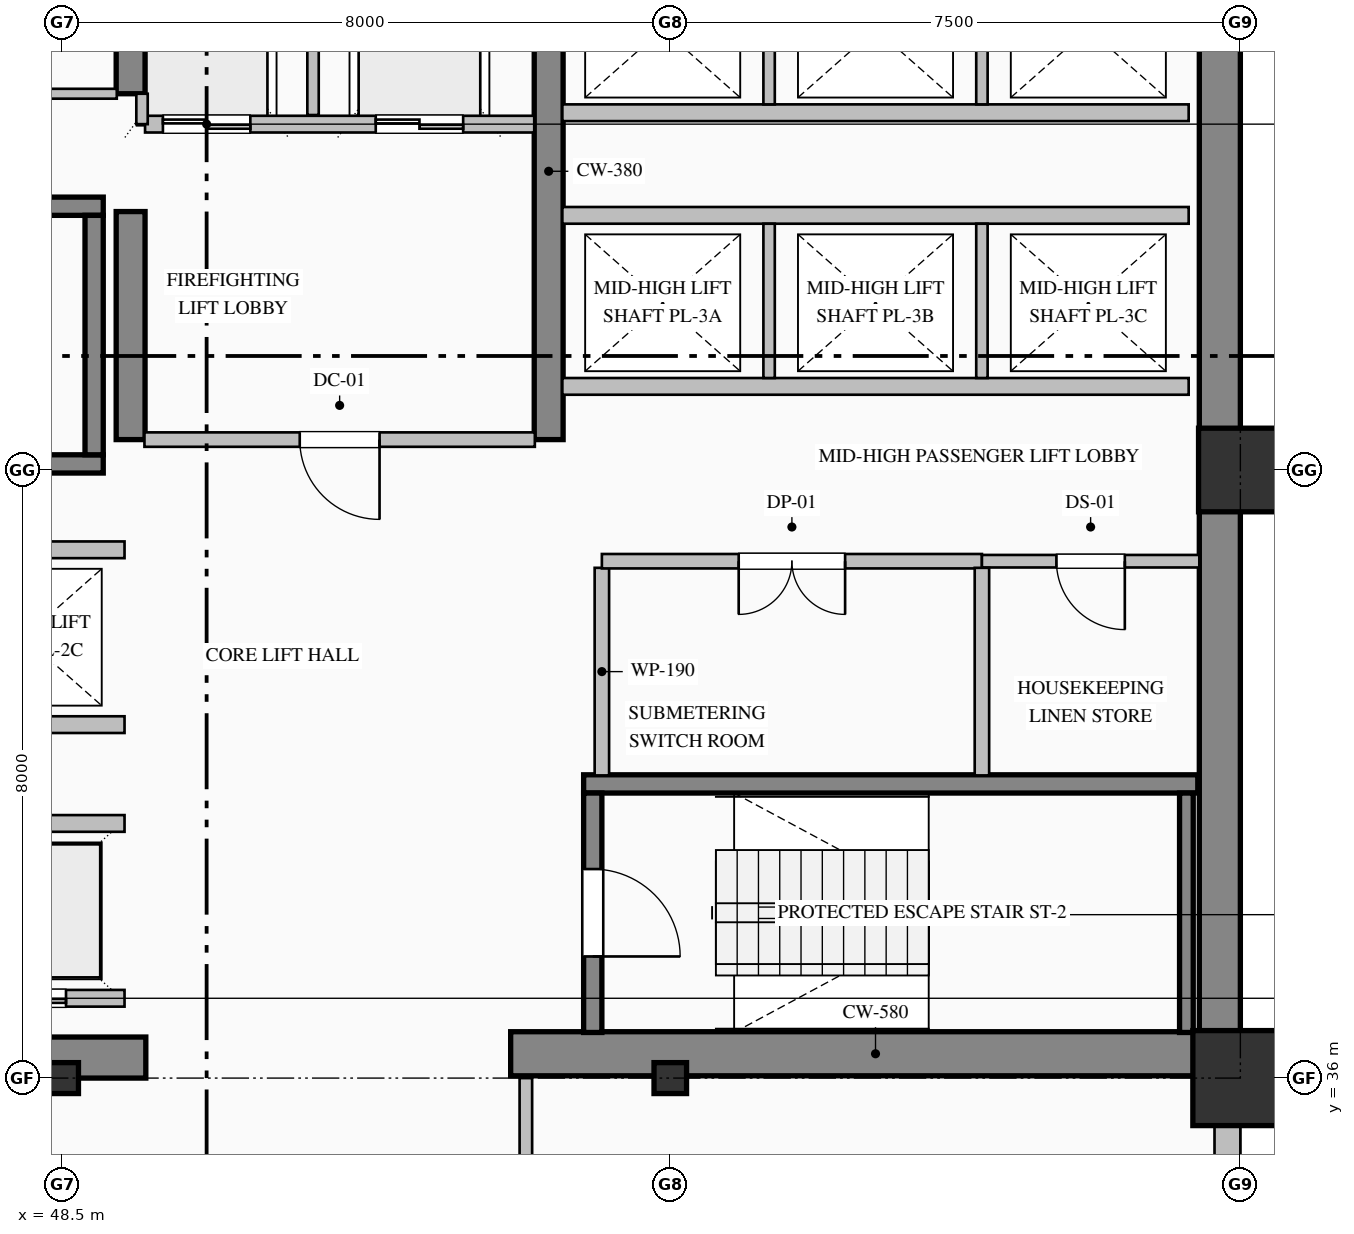
"""IFC4 building model, lengths in metres.
Left out: names, types, materials, properties, quantities, classifications, styles, units other than length and angle.
Written with IfcOpenShell. Run it as: python <this file> out.ifc"""

import sys

from ifc_helpers import new_model, si_unit, direction, frame, frame_2d, origin, origin_2d, place, context, subcontext, project, spatial, rectangle, hollow_rectangle, i_section, extrude, element, fill, save


model = new_model("IFC4")
c1 = context("Model", 3, precision=1e-05, world=origin(), true_north=direction((0.0, 1.0)))
c2 = subcontext(c1, "Body", "Model", "MODEL_VIEW")
j1 = project(units=[si_unit("LENGTHUNIT", "METRE"), si_unit("PLANEANGLEUNIT", "RADIAN")], contexts=[c1])
p1 = place(None, origin())
s1 = spatial("IfcSite", under=j1, at=p1, CompositionType="ELEMENT")
p2 = place(p1, origin())
s2 = spatial("IfcBuilding", under=s1, at=p2, CompositionType="ELEMENT")
p3 = place(p2, frame((0.0, 0.0, 48.2)))
s3 = spatial("IfcBuildingStorey", under=s2, at=p3, CompositionType="ELEMENT", Elevation=48.2)
p4 = place(p3, frame((63.73, 36.32, 0.0), z_axis=(0.0, 0.0, 1.0), x_axis=(0.0, 1.0, 0.0)))
e1 = element("IfcWall", 1, at=p4, inside=s3, PredefinedType="SHEAR", context=c2, shape_type="SweptSolid", body=[
    extrude(rectangle(XDim=15.14, YDim=0.54, at=frame_2d((7.57, 0.0))), origin(), (0.0, 0.0, 1.0), 3.75),
])
p5 = place(p3, frame((48.2, 36.27, 0.0), z_axis=(0.0, 0.0, 1.0), x_axis=(1.0, 0.0, 0.0)))
e2 = element("IfcWall", 2, at=p5, inside=s3, PredefinedType="SHEAR", context=c2, shape_type="SweptSolid", body=[
    extrude(rectangle(XDim=1.4, YDim=0.54, at=frame_2d((0.7, 0.0))), origin(), (0.0, 0.0, 1.0), 3.75),
])
p6 = place(p3, frame((54.4, 36.32, 0.0), z_axis=(0.0, 0.0, 1.0), x_axis=(1.0, 0.0, 0.0)))
e3 = element("IfcWall", 3, at=p6, inside=s3, PredefinedType="SHEAR", context=c2, shape_type="SweptSolid", body=[
    extrude(rectangle(XDim=9.6, YDim=0.58, at=frame_2d((4.8, 0.0))), origin(), (0.0, 0.0, 1.0), 4.0),
])
p7 = place(p3, frame((49.4, 44.4, 0.0), z_axis=(0.0, 0.0, 1.0), x_axis=(0.0, 1.0, 0.0)))
e4 = element("IfcWall", 4, at=p7, inside=s3, PredefinedType="SHEAR", context=c2, shape_type="SweptSolid", body=[
    extrude(rectangle(XDim=3.0, YDim=0.38, at=frame_2d((1.5, 0.0))), origin(), (0.0, 0.0, 1.0), 3.75),
])
p8 = place(p3, frame((49.4, 48.95, 0.0), z_axis=(0.0, 0.0, 1.0), x_axis=(0.0, 1.0, 0.0)))
e5 = element("IfcWall", 5, at=p8, inside=s3, PredefinedType="SHEAR", context=c2, shape_type="SweptSolid", body=[
    extrude(rectangle(XDim=2.51, YDim=0.38, at=frame_2d((1.255, 0.0))), origin(), (0.0, 0.0, 1.0), 3.75),
])
p9 = place(p3, frame((54.9, 44.4, 0.0), z_axis=(0.0, 0.0, 1.0), x_axis=(0.0, 1.0, 0.0)))
e6 = element("IfcWall", 6, at=p9, inside=s3, PredefinedType="SHEAR", context=c2, shape_type="SweptSolid", body=[
    extrude(rectangle(XDim=7.06, YDim=0.38, at=frame_2d((3.53, 0.0))), origin(), (0.0, 0.0, 1.0), 3.75),
])
for number, where, z_axis, x_axis in (
    (7, (48.5, 36.0, 0.0), (0.0, 0.0, 1.0), (1.0, 0.0, 0.0)),
    (8, (56.5, 36.0, 0.0), (0.0, 0.0, 1.0), (1.0, 0.0, 0.0)),
):
    element("IfcColumn", number, at=place(p3, frame(where, z_axis=z_axis, x_axis=x_axis)), inside=s3, PredefinedType="COLUMN", context=c2, shape_type="SweptSolid", body=[
        extrude(i_section(OverallWidth=0.407, OverallDepth=0.428, WebThickness=0.02, FlangeThickness=0.035, FilletRadius=0.022, at=origin_2d()), origin(), (0.0, 0.0, 1.0), 4.0),
    ])
p10 = place(p3, frame((64.0, 36.0, 0.0), z_axis=(0.0, 0.0, 1.0), x_axis=(1.0, 0.0, 0.0)))
e9 = element("IfcColumn", 9, at=p10, inside=s3, PredefinedType="COLUMN", context=c2, shape_type="SweptSolid", body=[
    extrude(hollow_rectangle(XDim=1.25, YDim=1.25, WallThickness=0.045, at=origin_2d()), origin(), (0.0, 0.0, 1.0), 4.0),
])
p11 = place(p3, frame((64.0, 44.0, 0.0), z_axis=(0.0, 0.0, 1.0), x_axis=(1.0, 0.0, 0.0)))
e10 = element("IfcColumn", 10, at=p11, inside=s3, PredefinedType="COLUMN", context=c2, shape_type="SweptSolid", body=[
    extrude(hollow_rectangle(XDim=1.1, YDim=1.1, WallThickness=0.04, at=origin_2d()), origin(), (0.0, 0.0, 1.0), 4.0),
])
p12 = place(p3, frame((63.83, 36.05, 0.0), z_axis=(0.0, 0.0, 1.0), x_axis=(0.0, -1.0, 0.0)))
e11 = element("IfcWall", 11, at=p12, inside=s3, PredefinedType="SOLIDWALL", context=c2, shape_type="SweptSolid", body=[
    extrude(rectangle(XDim=28.05, YDim=0.34, at=frame_2d((14.025, 0.0))), origin(), (0.0, 0.0, 1.0), 3.25),
])
p13 = place(p12, frame((2.4, 0.0, 0.8)))
e12 = element("IfcOpeningElement", 12, at=p13, cuts=e11, PredefinedType="OPENING", context=c2, shape_type="SweptSolid", body=[
    extrude(rectangle(XDim=2.4, YDim=2.15, at=frame_2d((1.2, 1.075))), frame((0.0, 0.18, 0.0), z_axis=(0.0, -1.0, 0.0), x_axis=(1.0, 0.0, 0.0)), (0.0, 0.0, 1.0), 0.36),
])
p14 = place(p12, frame((9.75, 0.0, 0.85)))
e13 = element("IfcOpeningElement", 13, at=p14, cuts=e11, PredefinedType="OPENING", context=c2, shape_type="SweptSolid", body=[
    extrude(rectangle(XDim=2.1, YDim=2.05, at=frame_2d((1.05, 1.025))), frame((0.0, 0.18, 0.0), z_axis=(0.0, -1.0, 0.0), x_axis=(1.0, 0.0, 0.0)), (0.0, 0.0, 1.0), 0.36),
])
p15 = place(p12, frame((13.2, 0.0, 0.8)))
e14 = element("IfcOpeningElement", 14, at=p15, cuts=e11, PredefinedType="OPENING", context=c2, shape_type="SweptSolid", body=[
    extrude(rectangle(XDim=2.4, YDim=2.15, at=frame_2d((1.2, 1.075))), frame((0.0, 0.18, 0.0), z_axis=(0.0, -1.0, 0.0), x_axis=(1.0, 0.0, 0.0)), (0.0, 0.0, 1.0), 0.36),
])
for number, where, z_axis, x_axis in (
    (15, (40.96, 47.47, 0.0), (0.0, 0.0, 1.0), (1.0, 0.0, 0.0)),
    (16, (49.04, 44.08, 0.0), (0.0, 0.0, 1.0), (-1.0, 0.0, 0.0)),
):
    element("IfcWall", number, at=place(p3, frame(where, z_axis=z_axis, x_axis=x_axis)), inside=s3, PredefinedType="SOLIDWALL", context=c2, shape_type="SweptSolid", body=[
        extrude(rectangle(XDim=8.08, YDim=0.24, at=frame_2d((4.04, 0.0))), origin(), (0.0, 0.0, 1.0), 4.0),
    ])
p16 = place(p3, frame((48.92, 44.2, 0.0), z_axis=(0.0, 0.0, 1.0), x_axis=(0.0, 1.0, 0.0)))
e17 = element("IfcWall", 17, at=p16, inside=s3, PredefinedType="SOLIDWALL", context=c2, shape_type="SweptSolid", body=[
    extrude(rectangle(XDim=3.15, YDim=0.24, at=frame_2d((1.575, 0.0))), origin(), (0.0, 0.0, 1.0), 4.0),
])
p17 = place(p3, frame((55.36, 39.87, 0.0), z_axis=(0.0, 0.0, 1.0), x_axis=(1.0, 0.0, 0.0)))
e18 = element("IfcWall", 18, at=p17, inside=s3, PredefinedType="SOLIDWALL", context=c2, shape_type="SweptSolid", body=[
    extrude(rectangle(XDim=8.08, YDim=0.24, at=frame_2d((4.04, 0.0))), origin(), (0.0, 0.0, 1.0), 4.0),
])
p18 = place(p3, frame((55.48, 39.75, 0.0), z_axis=(0.0, 0.0, 1.0), x_axis=(0.0, -1.0, 0.0)))
e19 = element("IfcWall", 19, at=p18, inside=s3, PredefinedType="SOLIDWALL", context=c2, shape_type="SweptSolid", body=[
    extrude(rectangle(XDim=3.15, YDim=0.24, at=frame_2d((1.575, 0.0))), origin(), (0.0, 0.0, 1.0), 4.0),
])
p19 = place(p18, frame((1.0, 0.0, 0.0)))
e20 = element("IfcOpeningElement", 20, at=p19, cuts=e19, PredefinedType="OPENING", context=c2, shape_type="SweptSolid", body=[
    extrude(rectangle(XDim=1.15, YDim=2.2, at=frame_2d((0.575, 1.1))), frame((0.0, 0.13, 0.0), z_axis=(0.0, -1.0, 0.0), x_axis=(1.0, 0.0, 0.0)), (0.0, 0.0, 1.0), 0.26),
])
p20 = place(p3, frame((63.29, 36.6, 0.0), z_axis=(0.0, 0.0, 1.0), x_axis=(0.0, 1.0, 0.0)))
e21 = element("IfcWall", 21, at=p20, inside=s3, PredefinedType="SOLIDWALL", context=c2, shape_type="SweptSolid", body=[
    extrude(rectangle(XDim=3.15, YDim=0.18, at=frame_2d((1.575, 0.0))), origin(), (0.0, 0.0, 1.0), 4.0),
])
p21 = place(p3, frame((54.71, 48.55, 0.0), z_axis=(0.0, 0.0, 1.0), x_axis=(-1.0, 0.0, 0.0)))
e22 = element("IfcWall", 22, at=p21, inside=s3, PredefinedType="PARTITIONING", context=c2, shape_type="SweptSolid", body=[
    extrude(rectangle(XDim=5.12, YDim=0.22, at=frame_2d((2.56, 0.0))), origin(), (0.0, 0.0, 1.0), 3.75),
])
p22 = place(p21, frame((3.735, 0.0, 0.0)))
e23 = element("IfcOpeningElement", 23, at=p22, cuts=e22, PredefinedType="OPENING", context=c2, shape_type="SweptSolid", body=[
    extrude(rectangle(XDim=1.15, YDim=2.2, at=frame_2d((0.575, 1.1))), frame((0.0, 0.12, 0.0), z_axis=(0.0, -1.0, 0.0), x_axis=(1.0, 0.0, 0.0)), (0.0, 0.0, 1.0), 0.24),
])
p23 = place(p21, frame((0.935, 0.0, 0.0)))
e24 = element("IfcOpeningElement", 24, at=p23, cuts=e22, PredefinedType="OPENING", context=c2, shape_type="SweptSolid", body=[
    extrude(rectangle(XDim=1.15, YDim=2.2, at=frame_2d((0.575, 1.1))), frame((0.0, 0.12, 0.0), z_axis=(0.0, -1.0, 0.0), x_axis=(1.0, 0.0, 0.0)), (0.0, 0.0, 1.0), 0.24),
])
p24 = place(p3, frame((51.8, 48.67, 0.0), z_axis=(0.0, 0.0, 1.0), x_axis=(0.0, 1.0, 0.0)))
e25 = element("IfcWall", 25, at=p24, inside=s3, PredefinedType="PARTITIONING", context=c2, shape_type="SweptSolid", body=[
    extrude(rectangle(XDim=2.79, YDim=0.15, at=frame_2d((1.395, 0.0))), origin(), (0.0, 0.0, 1.0), 3.75),
])
p25 = place(p3, frame((49.55, 48.55, 0.0), z_axis=(0.0, 0.0, 1.0), x_axis=(0.0, 1.0, 0.0)))
e26 = element("IfcWall", 26, at=p25, inside=s3, PredefinedType="PARTITIONING", context=c2, shape_type="SweptSolid", body=[
    extrude(rectangle(XDim=0.4, YDim=0.15, at=frame_2d((0.2, 0.0))), origin(), (0.0, 0.0, 1.0), 3.75),
])
p26 = place(p3, frame((49.32, 37.05, 0.0), z_axis=(0.0, 0.0, 1.0), x_axis=(-1.0, 0.0, 0.0)))
e27 = element("IfcWall", 27, at=p26, inside=s3, PredefinedType="PARTITIONING", context=c2, shape_type="SweptSolid", body=[
    extrude(rectangle(XDim=8.24, YDim=0.22, at=frame_2d((4.12, 0.0))), origin(), (0.0, 0.0, 1.0), 3.75),
])
p27 = place(p26, frame((6.37, 0.0, 0.0)))
e28 = element("IfcOpeningElement", 28, at=p27, cuts=e27, PredefinedType="OPENING", context=c2, shape_type="SweptSolid", body=[
    extrude(rectangle(XDim=1.1, YDim=2.2, at=frame_2d((0.55, 1.1))), frame((0.0, 0.12, 0.0), z_axis=(0.0, -1.0, 0.0), x_axis=(1.0, 0.0, 0.0)), (0.0, 0.0, 1.0), 0.24),
])
p28 = place(p26, frame((3.57, 0.0, 0.0)))
e29 = element("IfcOpeningElement", 29, at=p28, cuts=e27, PredefinedType="OPENING", context=c2, shape_type="SweptSolid", body=[
    extrude(rectangle(XDim=1.1, YDim=2.2, at=frame_2d((0.55, 1.1))), frame((0.0, 0.12, 0.0), z_axis=(0.0, -1.0, 0.0), x_axis=(1.0, 0.0, 0.0)), (0.0, 0.0, 1.0), 0.24),
])
p29 = place(p26, frame((0.77, 0.0, 0.0)))
e30 = element("IfcOpeningElement", 30, at=p29, cuts=e27, PredefinedType="OPENING", context=c2, shape_type="SweptSolid", body=[
    extrude(rectangle(XDim=1.1, YDim=2.2, at=frame_2d((0.55, 1.1))), frame((0.0, 0.12, 0.0), z_axis=(0.0, -1.0, 0.0), x_axis=(1.0, 0.0, 0.0)), (0.0, 0.0, 1.0), 0.24),
])
for number, where, z_axis, x_axis in (
    (31, (41.08, 39.35, 0.0), (0.0, 0.0, 1.0), (1.0, 0.0, 0.0)),
    (32, (49.32, 40.65, 0.0), (0.0, 0.0, 1.0), (-1.0, 0.0, 0.0)),
    (33, (41.08, 42.95, 0.0), (0.0, 0.0, 1.0), (1.0, 0.0, 0.0)),
    (34, (63.32, 45.1, 0.0), (0.0, 0.0, 1.0), (-1.0, 0.0, 0.0)),
    (35, (55.08, 47.35, 0.0), (0.0, 0.0, 1.0), (1.0, 0.0, 0.0)),
):
    element("IfcWall", number, at=place(p3, frame(where, z_axis=z_axis, x_axis=x_axis)), inside=s3, PredefinedType="PARTITIONING", context=c2, shape_type="SweptSolid", body=[
        extrude(rectangle(XDim=8.24, YDim=0.22, at=frame_2d((4.12, 0.0))), origin(), (0.0, 0.0, 1.0), 3.75),
    ])
for number, where, z_axis, x_axis in (
    (36, (57.8, 45.21, 0.0), (0.0, 0.0, 1.0), (0.0, 1.0, 0.0)),
    (37, (60.6, 45.21, 0.0), (0.0, 0.0, 1.0), (0.0, 1.0, 0.0)),
):
    element("IfcWall", number, at=place(p3, frame(where, z_axis=z_axis, x_axis=x_axis)), inside=s3, PredefinedType="PARTITIONING", context=c2, shape_type="SweptSolid", body=[
        extrude(rectangle(XDim=2.03, YDim=0.15, at=frame_2d((1.015, 0.0))), origin(), (0.0, 0.0, 1.0), 3.75),
    ])
p30 = place(p3, frame((63.32, 48.7, 0.0), z_axis=(0.0, 0.0, 1.0), x_axis=(-1.0, 0.0, 0.0)))
e38 = element("IfcWall", 38, at=p30, inside=s3, PredefinedType="PARTITIONING", context=c2, shape_type="SweptSolid", body=[
    extrude(rectangle(XDim=8.24, YDim=0.22, at=frame_2d((4.12, 0.0))), origin(), (0.0, 0.0, 1.0), 3.75),
])
for number, where, z_axis, x_axis in (
    (39, (57.8, 48.81, 0.0), (0.0, 0.0, 1.0), (0.0, 1.0, 0.0)),
    (40, (60.6, 48.81, 0.0), (0.0, 0.0, 1.0), (0.0, 1.0, 0.0)),
):
    element("IfcWall", number, at=place(p3, frame(where, z_axis=z_axis, x_axis=x_axis)), inside=s3, PredefinedType="PARTITIONING", context=c2, shape_type="SweptSolid", body=[
        extrude(rectangle(XDim=2.65, YDim=0.15, at=frame_2d((1.325, 0.0))), origin(), (0.0, 0.0, 1.0), 3.75),
    ])
p31 = place(p3, frame((43.5, 48.95, 0.0), z_axis=(0.0, 0.0, 1.0), x_axis=(1.0, 0.0, 0.0)))
e41 = element("IfcWall", 41, at=p31, inside=s3, PredefinedType="PARTITIONING", context=c2, shape_type="SweptSolid", body=[
    extrude(rectangle(XDim=5.718, YDim=0.13, at=frame_2d((2.859, 0.0))), origin(), (0.0, 0.0, 1.0), 3.75),
])
p32 = place(p31, frame((2.399, 0.0, 0.0)))
e42 = element("IfcOpeningElement", 42, at=p32, cuts=e41, PredefinedType="OPENING", context=c2, shape_type="SweptSolid", body=[
    extrude(rectangle(XDim=0.92, YDim=2.15, at=frame_2d((0.46, 1.075))), frame((0.0, 0.075, 0.0), z_axis=(0.0, -1.0, 0.0), x_axis=(1.0, 0.0, 0.0)), (0.0, 0.0, 1.0), 0.15),
])
p33 = place(p3, frame((54.718, 44.4, 0.0), z_axis=(0.0, 0.0, 1.0), x_axis=(-1.0, 0.0, 0.0)))
e43 = element("IfcWall", 43, at=p33, inside=s3, PredefinedType="PARTITIONING", context=c2, shape_type="SweptSolid", body=[
    extrude(rectangle(XDim=5.136, YDim=0.19, at=frame_2d((2.568, 0.0))), origin(), (0.0, 0.0, 1.0), 3.75),
])
p34 = place(p33, frame((2.043, 0.0, 0.0)))
e44 = element("IfcOpeningElement", 44, at=p34, cuts=e43, PredefinedType="OPENING", context=c2, shape_type="SweptSolid", body=[
    extrude(rectangle(XDim=1.05, YDim=2.15, at=frame_2d((0.525, 1.075))), frame((0.0, 0.105, 0.0), z_axis=(0.0, -1.0, 0.0), x_axis=(1.0, 0.0, 0.0)), (0.0, 0.0, 1.0), 0.21),
])
p35 = place(p3, frame((55.6, 42.713, 0.0), z_axis=(0.0, 0.0, 1.0), x_axis=(0.0, -1.0, 0.0)))
e45 = element("IfcWall", 45, at=p35, inside=s3, PredefinedType="PARTITIONING", context=c2, shape_type="SweptSolid", body=[
    extrude(rectangle(XDim=2.731, YDim=0.19, at=frame_2d((1.365, 0.0))), origin(), (0.0, 0.0, 1.0), 3.75),
])
p36 = place(p3, frame((60.6, 42.8, 0.0), z_axis=(0.0, 0.0, 1.0), x_axis=(-1.0, 0.0, 0.0)))
e46 = element("IfcWall", 46, at=p36, inside=s3, PredefinedType="PARTITIONING", context=c2, shape_type="SweptSolid", body=[
    extrude(rectangle(XDim=5.0, YDim=0.19, at=frame_2d((2.5, 0.0))), origin(), (0.0, 0.0, 1.0), 3.75),
])
p37 = place(p36, frame((1.8, 0.0, 0.0)))
e47 = element("IfcOpeningElement", 47, at=p37, cuts=e46, PredefinedType="OPENING", context=c2, shape_type="SweptSolid", body=[
    extrude(rectangle(XDim=1.4, YDim=2.25, at=frame_2d((0.7, 1.125))), frame((0.0, 0.105, 0.0), z_axis=(0.0, -1.0, 0.0), x_axis=(1.0, 0.0, 0.0)), (0.0, 0.0, 1.0), 0.21),
])
p38 = place(p3, frame((63.46, 42.8, 0.0), z_axis=(0.0, 0.0, 1.0), x_axis=(-1.0, 0.0, 0.0)))
e48 = element("IfcWall", 48, at=p38, inside=s3, PredefinedType="PARTITIONING", context=c2, shape_type="SweptSolid", body=[
    extrude(rectangle(XDim=2.86, YDim=0.165, at=frame_2d((1.43, 0.0))), origin(), (0.0, 0.0, 1.0), 3.75),
])
p39 = place(p38, frame((0.98, 0.0, 0.0)))
e49 = element("IfcOpeningElement", 49, at=p39, cuts=e48, PredefinedType="OPENING", context=c2, shape_type="SweptSolid", body=[
    extrude(rectangle(XDim=0.9, YDim=2.15, at=frame_2d((0.45, 1.075))), frame((0.0, 0.093, 0.0), z_axis=(0.0, -1.0, 0.0), x_axis=(1.0, 0.0, 0.0)), (0.0, 0.0, 1.0), 0.185),
])
p40 = place(p3, frame((60.6, 42.713, 0.0), z_axis=(0.0, 0.0, 1.0), x_axis=(0.0, -1.0, 0.0)))
e50 = element("IfcWall", 50, at=p40, inside=s3, PredefinedType="PARTITIONING", context=c2, shape_type="SweptSolid", body=[
    extrude(rectangle(XDim=2.731, YDim=0.19, at=frame_2d((1.365, 0.0))), origin(), (0.0, 0.0, 1.0), 3.75),
])
p41 = place(p3, frame((54.6, 36.0, 0.0), z_axis=(0.0, 0.0, 1.0), x_axis=(0.0, -1.0, 0.0)))
e51 = element("IfcWall", 51, at=p41, inside=s3, PredefinedType="PARTITIONING", context=c2, shape_type="SweptSolid", body=[
    extrude(rectangle(XDim=2.125, YDim=0.165, at=frame_2d((1.063, 0.0))), origin(), (0.0, 0.0, 1.0), 3.75),
])
p42 = place(p19, origin())
e52 = element("IfcDoor", 52, at=p42, inside=s3, OperationType="SINGLE_SWING_RIGHT", PredefinedType="DOOR", context=c2, shape_type="SweptSolid", body=[
    extrude(rectangle(XDim=1.15, YDim=2.2, at=frame_2d((0.575, 1.1))), frame((0.0, 0.025, 0.0), z_axis=(0.0, -1.0, 0.0), x_axis=(1.0, 0.0, 0.0)), (0.0, 0.0, 1.0), 0.05),
])
fill(e20, e52)
p43 = place(p22, origin())
e53 = element("IfcDoor", 53, at=p43, inside=s3, OperationType="DOUBLE_DOOR_SLIDING", PredefinedType="DOOR", context=c2, shape_type="SweptSolid", body=[
    extrude(rectangle(XDim=1.15, YDim=2.2, at=frame_2d((0.575, 1.1))), frame((0.0, 0.025, 0.0), z_axis=(0.0, -1.0, 0.0), x_axis=(1.0, 0.0, 0.0)), (0.0, 0.0, 1.0), 0.05),
])
fill(e23, e53)
p44 = place(p23, origin())
e54 = element("IfcDoor", 54, at=p44, inside=s3, OperationType="DOUBLE_DOOR_SLIDING", PredefinedType="DOOR", context=c2, shape_type="SweptSolid", body=[
    extrude(rectangle(XDim=1.15, YDim=2.2, at=frame_2d((0.575, 1.1))), frame((0.0, 0.025, 0.0), z_axis=(0.0, -1.0, 0.0), x_axis=(1.0, 0.0, 0.0)), (0.0, 0.0, 1.0), 0.05),
])
fill(e24, e54)
p45 = place(p29, origin())
e55 = element("IfcDoor", 55, at=p45, inside=s3, OperationType="DOUBLE_DOOR_SLIDING", PredefinedType="DOOR", context=c2, shape_type="SweptSolid", body=[
    extrude(rectangle(XDim=1.1, YDim=2.2, at=frame_2d((0.55, 1.1))), frame((0.0, 0.025, 0.0), z_axis=(0.0, -1.0, 0.0), x_axis=(1.0, 0.0, 0.0)), (0.0, 0.0, 1.0), 0.05),
])
fill(e30, e55)
p46 = place(p34, origin())
e56 = element("IfcDoor", 56, at=p46, inside=s3, OperationType="SINGLE_SWING_LEFT", PredefinedType="DOOR", context=c2, shape_type="SweptSolid", body=[
    extrude(rectangle(XDim=1.05, YDim=2.15, at=frame_2d((0.525, 1.075))), frame((0.0, 0.025, 0.0), z_axis=(0.0, -1.0, 0.0), x_axis=(1.0, 0.0, 0.0)), (0.0, 0.0, 1.0), 0.05),
])
fill(e44, e56)
p47 = place(p37, origin())
e57 = element("IfcDoor", 57, at=p47, inside=s3, OperationType="DOUBLE_DOOR_SINGLE_SWING", PredefinedType="DOOR", context=c2, shape_type="SweptSolid", body=[
    extrude(rectangle(XDim=1.4, YDim=2.25, at=frame_2d((0.7, 1.125))), frame((0.0, 0.025, 0.0), z_axis=(0.0, -1.0, 0.0), x_axis=(1.0, 0.0, 0.0)), (0.0, 0.0, 1.0), 0.05),
])
fill(e47, e57)
p48 = place(p39, origin())
e58 = element("IfcDoor", 58, at=p48, inside=s3, OperationType="SINGLE_SWING_LEFT", PredefinedType="DOOR", context=c2, shape_type="SweptSolid", body=[
    extrude(rectangle(XDim=0.9, YDim=2.15, at=frame_2d((0.45, 1.075))), frame((0.0, 0.025, 0.0), z_axis=(0.0, -1.0, 0.0), x_axis=(1.0, 0.0, 0.0)), (0.0, 0.0, 1.0), 0.05),
])
fill(e49, e58)
save(model, sys.argv[1])
